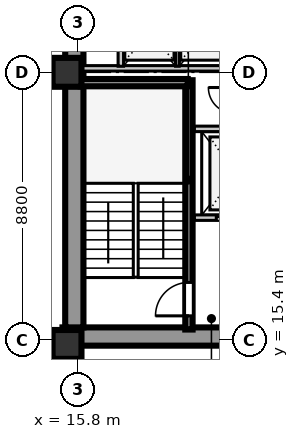
"""IFC4 building model, lengths in metres.
Left out: names, types, materials, properties, quantities, classifications, styles, units other than length and angle.
Written with IfcOpenShell. Run it as: python <this file> out.ifc"""

import sys

from ifc_helpers import new_model, si_unit, direction, frame, frame_2d, origin, origin_2d, place, context, subcontext, project, spatial, rectangle, extrude, element, fill, save


model = new_model("IFC4")
c1 = context("Model", 3, precision=1e-05, world=origin(), true_north=direction((0.0, 1.0)))
c2 = subcontext(c1, "Body", "Model", "MODEL_VIEW")
j1 = project(units=[si_unit("LENGTHUNIT", "METRE"), si_unit("PLANEANGLEUNIT", "RADIAN")], contexts=[c1])
p1 = place(None, origin())
s1 = spatial("IfcSite", under=j1, at=p1, CompositionType="ELEMENT")
p2 = place(p1, origin())
s2 = spatial("IfcBuilding", under=s1, at=p2, CompositionType="ELEMENT")
p3 = place(p2, frame((0.0, 0.0, 50.0)))
s3 = spatial("IfcBuildingStorey", under=s2, at=p3, CompositionType="ELEMENT", Elevation=50.0)
p4 = place(p3, frame((15.3, 15.51, 0.0), z_axis=(0.0, 0.0, 1.0), x_axis=(1.0, 0.0, 0.0)))
e1 = element("IfcWall", 1, at=p4, inside=s3, PredefinedType="SHEAR", context=c2, shape_type="SweptSolid", body=[
    extrude(rectangle(XDim=9.88, YDim=0.6, at=frame_2d((4.94, 0.0))), origin(), (0.0, 0.0, 1.0), 3.72),
])
p5 = place(p3, frame((15.69, 15.81, 0.0), z_axis=(0.0, 0.0, 1.0), x_axis=(0.0, 1.0, 0.0)))
e2 = element("IfcWall", 2, at=p5, inside=s3, PredefinedType="SHEAR", context=c2, shape_type="SweptSolid", body=[
    extrude(rectangle(XDim=25.63, YDim=0.6, at=frame_2d((12.815, 0.0))), origin(), (0.0, 0.0, 1.0), 3.72),
])
for number, where, z_axis, x_axis in (
    (3, (15.45, 15.25, 0.0), (0.0, 0.0, 1.0), (1.0, 0.0, 0.0)),
    (4, (15.45, 24.2, 0.0), (0.0, 0.0, 1.0), (1.0, 0.0, 0.0)),
):
    element("IfcColumn", number, at=place(p3, frame(where, z_axis=z_axis, x_axis=x_axis)), inside=s3, PredefinedType="COLUMN", context=c2, shape_type="SweptSolid", body=[
        extrude(rectangle(XDim=0.95, YDim=0.95, at=origin_2d()), origin(), (0.0, 0.0, 1.0), 3.72),
    ])
p6 = place(p3, frame((19.46, 15.74, 0.0), z_axis=(0.0, 0.0, 1.0), x_axis=(0.0, 1.0, 0.0)))
e5 = element("IfcWall", 5, at=p6, inside=s3, PredefinedType="SHEAR", context=c2, shape_type="SweptSolid", body=[
    extrude(rectangle(XDim=8.2, YDim=0.24, at=frame_2d((4.1, 0.0))), origin(), (0.0, 0.0, 1.0), 4.0),
])
p7 = place(p6, frame((0.45, 0.0, 0.0)))
e6 = element("IfcOpeningElement", 6, at=p7, cuts=e5, PredefinedType="OPENING", context=c2, shape_type="SweptSolid", body=[
    extrude(rectangle(XDim=1.1, YDim=2.1, at=frame_2d((0.55, 1.05))), frame((0.0, 0.13, 0.0), z_axis=(0.0, -1.0, 0.0), x_axis=(1.0, 0.0, 0.0)), (0.0, 0.0, 1.0), 0.26),
])
p8 = place(p3, frame((15.9, 23.86, 0.0), z_axis=(0.0, 0.0, 1.0), x_axis=(1.0, 0.0, 0.0)))
e7 = element("IfcWall", 7, at=p8, inside=s3, PredefinedType="SHEAR", context=c2, shape_type="SweptSolid", body=[
    extrude(rectangle(XDim=3.52, YDim=0.24, at=frame_2d((1.76, 0.0))), origin(), (0.0, 0.0, 1.0), 4.0),
])
p9 = place(p3, frame((19.64, 19.42, 0.0), z_axis=(0.0, 0.0, 1.0), x_axis=(1.0, 0.0, 0.0)))
e8 = element("IfcWall", 8, at=p9, inside=s3, PredefinedType="SOLIDWALL", context=c2, shape_type="SweptSolid", body=[
    extrude(rectangle(XDim=4.94, YDim=0.18, at=frame_2d((2.47, 0.0))), origin(), (0.0, 0.0, 1.0), 3.72),
])
p10 = place(p9, frame((0.72, 0.0, 0.0)))
e9 = element("IfcOpeningElement", 9, at=p10, cuts=e8, PredefinedType="OPENING", context=c2, shape_type="SweptSolid", body=[
    extrude(rectangle(XDim=1.1, YDim=2.1, at=frame_2d((0.55, 1.05))), frame((0.0, 0.1, 0.0), z_axis=(0.0, -1.0, 0.0), x_axis=(1.0, 0.0, 0.0)), (0.0, 0.0, 1.0), 0.2),
])
p11 = place(p9, frame((3.02, 0.0, 0.0)))
e10 = element("IfcOpeningElement", 10, at=p11, cuts=e8, PredefinedType="OPENING", context=c2, shape_type="SweptSolid", body=[
    extrude(rectangle(XDim=1.1, YDim=2.1, at=frame_2d((0.55, 1.05))), frame((0.0, 0.1, 0.0), z_axis=(0.0, -1.0, 0.0), x_axis=(1.0, 0.0, 0.0)), (0.0, 0.0, 1.0), 0.2),
])
p12 = place(p3, frame((19.64, 22.34, 0.0), z_axis=(0.0, 0.0, 1.0), x_axis=(1.0, 0.0, 0.0)))
e11 = element("IfcWall", 11, at=p12, inside=s3, PredefinedType="SOLIDWALL", context=c2, shape_type="SweptSolid", body=[
    extrude(rectangle(XDim=4.94, YDim=0.18, at=frame_2d((2.47, 0.0))), origin(), (0.0, 0.0, 1.0), 3.72),
])
p13 = place(p3, frame((15.9, 24.33, 0.0), z_axis=(0.0, 0.0, 1.0), x_axis=(1.0, 0.0, 0.0)))
e12 = element("IfcWall", 12, at=p13, inside=s3, PredefinedType="SOLIDWALL", context=c2, shape_type="SweptSolid", body=[
    extrude(rectangle(XDim=8.68, YDim=0.18, at=frame_2d((4.34, 0.0))), origin(), (0.0, 0.0, 1.0), 3.02),
])
p14 = place(p3, frame((17.22, 24.4, 0.0), z_axis=(0.0, 0.0, 1.0), x_axis=(0.0, 1.0, 0.0)))
e13 = element("IfcWall", 13, at=p14, inside=s3, PredefinedType="SOLIDWALL", context=c2, shape_type="SweptSolid", body=[
    extrude(rectangle(XDim=2.05, YDim=0.18, at=frame_2d((1.025, 0.0))), origin(), (0.0, 0.0, 1.0), 3.72),
])
p15 = place(p3, frame((19.08, 24.4, 0.0), z_axis=(0.0, 0.0, 1.0), x_axis=(0.0, 1.0, 0.0)))
e14 = element("IfcWall", 14, at=p15, inside=s3, PredefinedType="PARTITIONING", context=c2, shape_type="SweptSolid", body=[
    extrude(rectangle(XDim=2.05, YDim=0.12, at=frame_2d((1.025, 0.0))), origin(), (0.0, 0.0, 1.0), 3.72),
])
p16 = place(p7, origin())
e15 = element("IfcDoor", 15, at=p16, inside=s3, OperationType="SINGLE_SWING_LEFT", PredefinedType="DOOR", context=c2, shape_type="SweptSolid", body=[
    extrude(rectangle(XDim=1.1, YDim=2.1, at=frame_2d((0.55, 1.05))), frame((0.0, 0.025, 0.0), z_axis=(0.0, -1.0, 0.0), x_axis=(1.0, 0.0, 0.0)), (0.0, 0.0, 1.0), 0.05),
])
fill(e6, e15)
p17 = place(p10, origin())
e16 = element("IfcDoor", 16, at=p17, inside=s3, OperationType="DOUBLE_DOOR_SLIDING", PredefinedType="DOOR", context=c2, shape_type="SweptSolid", body=[
    extrude(rectangle(XDim=1.1, YDim=2.1, at=frame_2d((0.55, 1.05))), frame((0.0, 0.025, 0.0), z_axis=(0.0, -1.0, 0.0), x_axis=(1.0, 0.0, 0.0)), (0.0, 0.0, 1.0), 0.05),
])
fill(e9, e16)
save(model, sys.argv[1])
